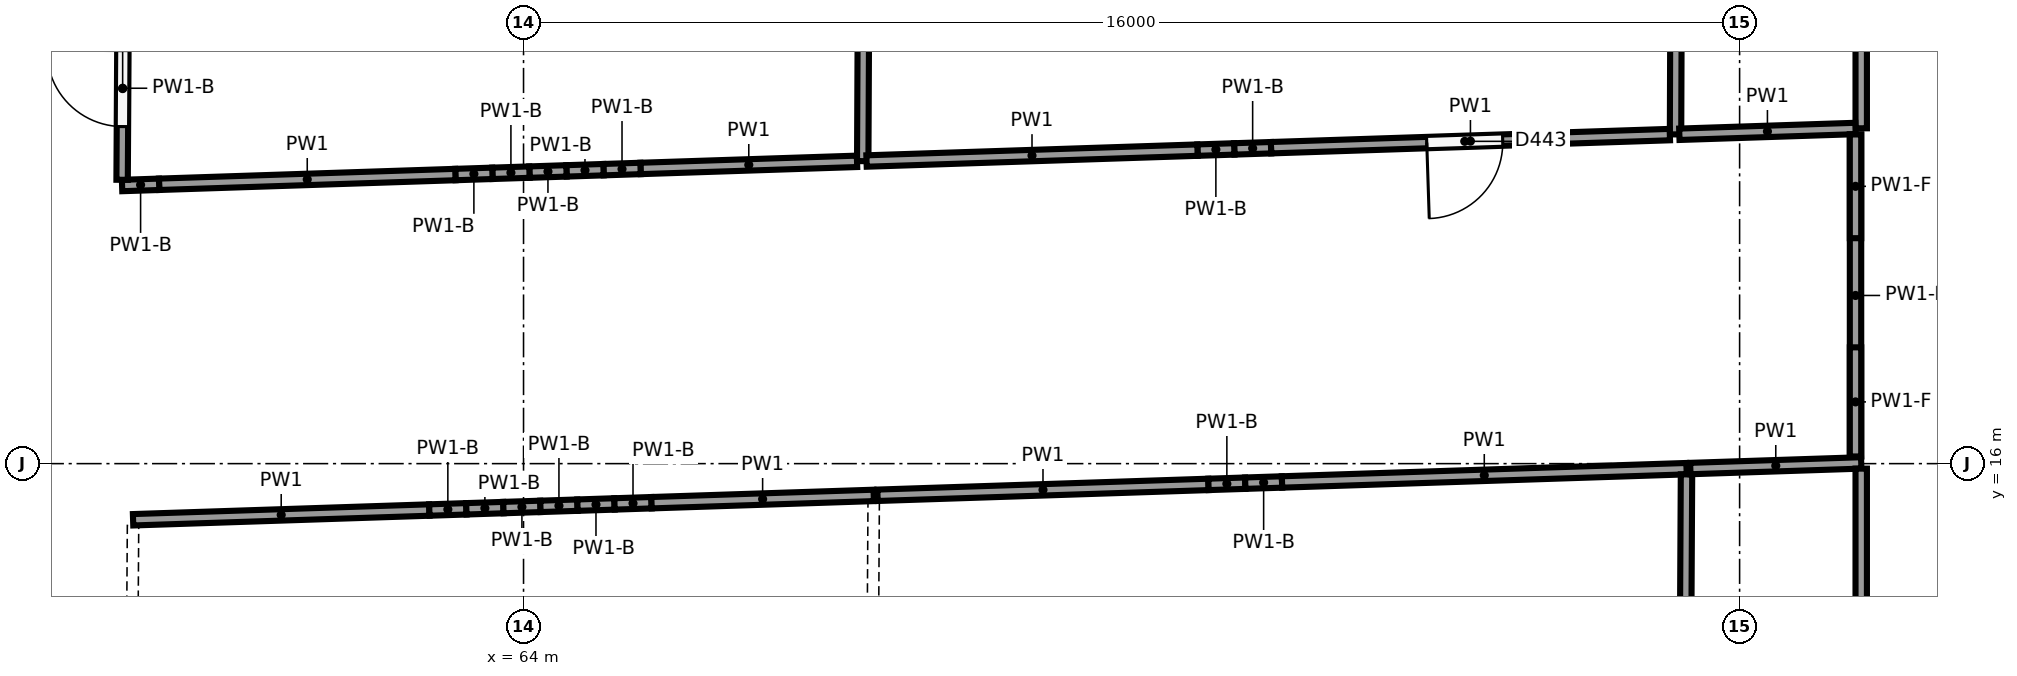
"""IFC4 building model, lengths in metres.
Left out: names, types, materials, properties, quantities, classifications, styles, units other than length and angle.
Written with IfcOpenShell. Run it as: python <this file> out.ifc"""

import sys

from ifc_helpers import new_model, si_unit, direction, frame, frame_2d, origin, origin_2d, place, context, subcontext, project, spatial, rectangle, circle, extrude, element, fill, save


model = new_model("IFC4")
c1 = context("Model", 3, precision=1e-05, world=origin(), true_north=direction((0.0, 1.0)))
c2 = subcontext(c1, "Body", "Model", "MODEL_VIEW")
j1 = project(units=[si_unit("LENGTHUNIT", "METRE"), si_unit("PLANEANGLEUNIT", "RADIAN")], contexts=[c1])
p1 = place(None, origin())
s1 = spatial("IfcSite", under=j1, at=p1, CompositionType="ELEMENT")
p2 = place(p1, origin())
s2 = spatial("IfcBuilding", under=s1, at=p2, CompositionType="ELEMENT")
p3 = place(p2, frame((0.0, 0.0, -4.0)))
s3 = spatial("IfcBuildingStorey", under=s2, at=p3, CompositionType="ELEMENT", Elevation=-4.0)
for number, where, z_axis, x_axis in (
    (1, (58.391, 17.447, -0.4), (0.0, 0.0, 1.0), (1.0, 0.0, 0.0)),
    (2, (63.588, 17.618, -0.4), (0.0, 0.0, 1.0), (1.0, 0.0, 0.0)),
):
    element("IfcColumn", number, at=place(p3, frame(where, z_axis=z_axis, x_axis=x_axis)), inside=s3, PredefinedType="COLUMN", context=c2, shape_type="SweptSolid", body=[
        extrude(circle(Radius=0.45, at=origin_2d()), origin(), (0.0, 0.0, 1.0), 4.4),
    ])
p4 = place(p3, frame((64.887, 17.661, -0.4), z_axis=(0.0, 0.0, 1.0), x_axis=(1.0, 0.0, 0.0)))
e3 = element("IfcColumn", 3, at=p4, inside=s3, PredefinedType="COLUMN", context=c2, shape_type="SweptSolid", body=[
    extrude(circle(Radius=0.4, at=origin_2d()), origin(), (0.0, 0.0, 1.0), 4.4),
])
p5 = place(p3, frame((73.482, 17.944, -0.4), z_axis=(0.0, 0.0, 1.0), x_axis=(1.0, 0.0, 0.0)))
e4 = element("IfcColumn", 4, at=p5, inside=s3, PredefinedType="COLUMN", context=c2, shape_type="SweptSolid", body=[
    extrude(circle(Radius=0.45, at=origin_2d()), origin(), (0.0, 0.0, 1.0), 4.4),
])
p6 = place(p3, frame((58.863, 15.261, 0.0), z_axis=(0.0, 0.0, 1.0), x_axis=(0.999459745106, 0.032866668724, 0.0)))
e5 = element("IfcWall", 5, at=p6, inside=s3, PredefinedType="PARTITIONING", context=c2, shape_type="SweptSolid", body=[
    extrude(rectangle(XDim=3.9, YDim=0.15, at=frame_2d((1.95, 0.0))), origin(), (0.0, 0.0, 1.0), 3.6),
])
for number, where, z_axis, x_axis in (
    (6, (62.76, 15.39, 0.0), (0.0, 0.0, 1.0), (0.999, 0.033, 0.0)),
    (7, (63.248, 15.406, 0.0), (0.0, 0.0, 1.0), (0.999, 0.033, 0.0)),
    (8, (63.735, 15.422, 0.0), (0.0, 0.0, 1.0), (0.999, 0.033, 0.0)),
):
    element("IfcWall", number, at=place(p3, frame(where, z_axis=z_axis, x_axis=x_axis)), inside=s3, PredefinedType="PARTITIONING", context=c2, shape_type="SweptSolid", body=[
        extrude(rectangle(XDim=0.488, YDim=0.15, at=frame_2d((0.244, 0.0))), origin(), (0.0, 0.0, 1.0), 2.5),
    ])
p7 = place(p3, frame((64.222, 15.438, 0.0), z_axis=(0.0, 0.0, 1.0), x_axis=(0.99946964665, 0.032564173951, 0.0)))
e9 = element("IfcWall", 9, at=p7, inside=s3, PredefinedType="PARTITIONING", context=c2, shape_type="SweptSolid", body=[
    extrude(rectangle(XDim=0.487, YDim=0.15, at=frame_2d((0.244, 0.0))), origin(), (0.0, 0.0, 1.0), 2.5),
])
for number, where, z_axis, x_axis in (
    (10, (64.709, 15.454, 0.0), (0.0, 0.0, 1.0), (0.999, 0.033, 0.0)),
    (11, (65.197, 15.47, 0.0), (0.0, 0.0, 1.0), (0.999, 0.033, 0.0)),
):
    element("IfcWall", number, at=place(p3, frame(where, z_axis=z_axis, x_axis=x_axis)), inside=s3, PredefinedType="PARTITIONING", context=c2, shape_type="SweptSolid", body=[
        extrude(rectangle(XDim=0.488, YDim=0.15, at=frame_2d((0.244, 0.0))), origin(), (0.0, 0.0, 1.0), 2.5),
    ])
p8 = place(p3, frame((65.684, 15.486, 0.0), z_axis=(0.0, 0.0, 1.0), x_axis=(0.999461822055, 0.032803448811, 0.0)))
e12 = element("IfcWall", 12, at=p8, inside=s3, PredefinedType="PARTITIONING", context=c2, shape_type="SweptSolid", body=[
    extrude(rectangle(XDim=2.925, YDim=0.15, at=frame_2d((1.462, 0.0))), origin(), (0.0, 0.0, 1.0), 3.6),
])
p9 = place(p3, frame((68.607, 15.507, 0.0), z_axis=(0.0, 0.0, 1.0), x_axis=(-0.006118883866, -0.999981279455, 0.0)))
e13 = element("IfcWall", 13, at=p9, inside=s3, PredefinedType="PARTITIONING", context=c2, shape_type="SweptSolid", body=[
    extrude(rectangle(XDim=9.097, YDim=0.15, at=frame_2d((4.549, 0.0))), origin(), (0.0, 0.0, 1.0), 3.6),
])
p10 = place(p3, frame((58.802, 6.317, 0.0), z_axis=(0.0, 0.0, 1.0), x_axis=(0.006771480952, 0.99997707326, 0.0)))
e14 = element("IfcWall", 14, at=p10, inside=s3, PredefinedType="PARTITIONING", context=c2, shape_type="SweptSolid", body=[
    extrude(rectangle(XDim=8.869, YDim=0.15, at=frame_2d((4.435, 0.0))), origin(), (0.0, 0.0, 1.0), 3.6),
])
p11 = place(p3, frame((68.657, 15.583, 0.0), z_axis=(0.0, 0.0, 1.0), x_axis=(0.999458873683, 0.032893157594, 0.0)))
e15 = element("IfcWall", 15, at=p11, inside=s3, PredefinedType="PARTITIONING", context=c2, shape_type="SweptSolid", body=[
    extrude(rectangle(XDim=4.357, YDim=0.15, at=frame_2d((2.178, 0.0))), origin(), (0.0, 0.0, 1.0), 3.6),
])
for number, where, z_axis, x_axis in (
    (16, (73.012, 15.727, 0.0), (0.0, 0.0, 1.0), (0.999, 0.033, 0.0)),
    (17, (73.496, 15.743, 0.0), (0.0, 0.0, 1.0), (0.999, 0.033, 0.0)),
):
    element("IfcWall", number, at=place(p3, frame(where, z_axis=z_axis, x_axis=x_axis)), inside=s3, PredefinedType="PARTITIONING", context=c2, shape_type="SweptSolid", body=[
        extrude(rectangle(XDim=0.484, YDim=0.15, at=frame_2d((0.242, 0.0))), origin(), (0.0, 0.0, 1.0), 2.5),
    ])
p12 = place(p3, frame((73.979, 15.759, 0.0), z_axis=(0.0, 0.0, 1.0), x_axis=(0.999461070607, 0.03282633608, 0.0)))
e18 = element("IfcWall", 18, at=p12, inside=s3, PredefinedType="PARTITIONING", context=c2, shape_type="SweptSolid", body=[
    extrude(rectangle(XDim=5.325, YDim=0.15, at=frame_2d((2.663, 0.0))), origin(), (0.0, 0.0, 1.0), 3.6),
])
p13 = place(p3, frame((79.301, 15.859, 0.0), z_axis=(0.0, 0.0, 1.0), x_axis=(-0.00544865386, -0.999985155975, 0.0)))
e19 = element("IfcWall", 19, at=p13, inside=s3, PredefinedType="PARTITIONING", context=c2, shape_type="SweptSolid", body=[
    extrude(rectangle(XDim=9.32, YDim=0.15, at=frame_2d((4.66, 0.0))), origin(), (0.0, 0.0, 1.0), 3.6),
])
p14 = place(p3, frame((79.352, 15.935, 0.0), z_axis=(0.0, 0.0, 1.0), x_axis=(0.999459266056, 0.032881233183, 0.0)))
e20 = element("IfcWall", 20, at=p14, inside=s3, PredefinedType="PARTITIONING", context=c2, shape_type="SweptSolid", body=[
    extrude(rectangle(XDim=2.25, YDim=0.15, at=frame_2d((1.125, 0.0))), origin(), (0.0, 0.0, 1.0), 3.6),
])
p15 = place(p3, frame((81.6, 15.934, 0.0), z_axis=(0.0, 0.0, 1.0), x_axis=(0.0, -1.0, 0.0)))
e21 = element("IfcWall", 21, at=p15, inside=s3, PredefinedType="PARTITIONING", context=c2, shape_type="SweptSolid", body=[
    extrude(rectangle(XDim=4.084, YDim=0.15, at=frame_2d((2.042, 0.0))), origin(), (0.0, 0.0, 1.0), 3.6),
])
p16 = place(p3, frame((68.506, 29.15, 0.0), z_axis=(0.0, 0.0, 1.0), x_axis=(-0.004738526292, -0.999988773121, 0.0)))
e22 = element("IfcWall", 22, at=p16, inside=s3, PredefinedType="PARTITIONING", context=c2, shape_type="SweptSolid", body=[
    extrude(rectangle(XDim=9.171, YDim=0.15, at=frame_2d((4.585, 0.0))), origin(), (0.0, 0.0, 1.0), 3.6),
])
p17 = place(p3, frame((68.388, 19.977, 0.0), z_axis=(0.0, 0.0, 1.0), x_axis=(-0.99945879552, -0.032895532483, 0.0)))
e23 = element("IfcWall", 23, at=p17, inside=s3, PredefinedType="PARTITIONING", context=c2, shape_type="SweptSolid", body=[
    extrude(rectangle(XDim=2.85, YDim=0.15, at=frame_2d((1.425, 0.0))), origin(), (0.0, 0.0, 1.0), 3.6),
])
p18 = place(p3, frame((65.539, 19.883, 0.0), z_axis=(0.0, 0.0, 1.0), x_axis=(-0.999470177511, -0.032547876522, 0.0)))
e24 = element("IfcWall", 24, at=p18, inside=s3, PredefinedType="PARTITIONING", context=c2, shape_type="SweptSolid", body=[
    extrude(rectangle(XDim=0.488, YDim=0.15, at=frame_2d((0.244, 0.0))), origin(), (0.0, 0.0, 1.0), 2.5),
])
p19 = place(p3, frame((65.052, 19.867, 0.0), z_axis=(0.0, 0.0, 1.0), x_axis=(-0.999453216043, -0.033064617674, 0.0)))
e25 = element("IfcWall", 25, at=p19, inside=s3, PredefinedType="PARTITIONING", context=c2, shape_type="SweptSolid", body=[
    extrude(rectangle(XDim=0.487, YDim=0.15, at=frame_2d((0.244, 0.0))), origin(), (0.0, 0.0, 1.0), 2.5),
])
for number, where, z_axis, x_axis in (
    (26, (64.565, 19.851, 0.0), (0.0, 0.0, 1.0), (-0.999, -0.033, 0.0)),
    (27, (64.078, 19.835, 0.0), (0.0, 0.0, 1.0), (-0.999, -0.033, 0.0)),
):
    element("IfcWall", number, at=place(p3, frame(where, z_axis=z_axis, x_axis=x_axis)), inside=s3, PredefinedType="PARTITIONING", context=c2, shape_type="SweptSolid", body=[
        extrude(rectangle(XDim=0.488, YDim=0.15, at=frame_2d((0.244, 0.0))), origin(), (0.0, 0.0, 1.0), 2.5),
    ])
p20 = place(p3, frame((63.59, 19.819, 0.0), z_axis=(0.0, 0.0, 1.0), x_axis=(-0.999453216043, -0.033064617674, 0.0)))
e28 = element("IfcWall", 28, at=p20, inside=s3, PredefinedType="PARTITIONING", context=c2, shape_type="SweptSolid", body=[
    extrude(rectangle(XDim=0.487, YDim=0.15, at=frame_2d((0.244, 0.0))), origin(), (0.0, 0.0, 1.0), 2.5),
])
p21 = place(p3, frame((63.103, 19.803, 0.0), z_axis=(0.0, 0.0, 1.0), x_axis=(-0.999459812725, -0.032864612406, 0.0)))
e29 = element("IfcWall", 29, at=p21, inside=s3, PredefinedType="PARTITIONING", context=c2, shape_type="SweptSolid", body=[
    extrude(rectangle(XDim=3.9, YDim=0.15, at=frame_2d((1.95, 0.0))), origin(), (0.0, 0.0, 1.0), 3.6),
])
p22 = place(p3, frame((59.205, 19.675, 0.0), z_axis=(0.0, 0.0, 1.0), x_axis=(-0.999453763336, -0.033048070331, 0.0)))
e30 = element("IfcWall", 30, at=p22, inside=s3, PredefinedType="PARTITIONING", context=c2, shape_type="SweptSolid", body=[
    extrude(rectangle(XDim=0.488, YDim=0.15, at=frame_2d((0.244, 0.0))), origin(), (0.0, 0.0, 1.0), 2.5),
])
p23 = place(p3, frame((58.719, 19.734, 0.0), z_axis=(0.0, 0.0, 1.0), x_axis=(0.005877482589, 0.99998272745, 0.0)))
e31 = element("IfcWall", 31, at=p23, inside=s3, PredefinedType="PARTITIONING", context=c2, shape_type="SweptSolid", body=[
    extrude(rectangle(XDim=2.409, YDim=0.15, at=frame_2d((1.205, 0.0))), origin(), (0.0, 0.0, 1.0), 2.5),
])
p24 = place(p23, frame((0.7, 0.0, 0.0)))
e32 = element("IfcOpeningElement", 32, at=p24, cuts=e31, PredefinedType="OPENING", context=c2, shape_type="SweptSolid", body=[
    extrude(rectangle(XDim=1.0, YDim=2.1, at=frame_2d((0.5, 1.05))), frame((0.0, 0.085, 0.0), z_axis=(0.0, -1.0, 0.0), x_axis=(1.0, 0.0, 0.0)), (0.0, 0.0, 1.0), 0.17),
])
p25 = place(p3, frame((79.191, 29.725, 0.0), z_axis=(0.0, 0.0, 1.0), x_axis=(-0.003612711966, -0.999993474135, 0.0)))
e33 = element("IfcWall", 33, at=p25, inside=s3, PredefinedType="PARTITIONING", context=c2, shape_type="SweptSolid", body=[
    extrude(rectangle(XDim=9.393, YDim=0.15, at=frame_2d((4.697, 0.0))), origin(), (0.0, 0.0, 1.0), 3.6),
])
p26 = place(p3, frame((79.082, 20.329, 0.0), z_axis=(0.0, 0.0, 1.0), x_axis=(-0.999459366608, -0.032878176633, 0.0)))
e34 = element("IfcWall", 34, at=p26, inside=s3, PredefinedType="PARTITIONING", context=c2, shape_type="SweptSolid", body=[
    extrude(rectangle(XDim=5.25, YDim=0.15, at=frame_2d((2.625, 0.0))), origin(), (0.0, 0.0, 1.0), 3.6),
])
p27 = place(p26, frame((2.2, 0.0, 0.0)))
e35 = element("IfcOpeningElement", 35, at=p27, cuts=e34, PredefinedType="OPENING", context=c2, shape_type="SweptSolid", body=[
    extrude(rectangle(XDim=1.0, YDim=2.1, at=frame_2d((0.5, 1.05))), frame((0.0, 0.085, 0.0), z_axis=(0.0, -1.0, 0.0), x_axis=(1.0, 0.0, 0.0)), (0.0, 0.0, 1.0), 0.17),
])
for number, where, z_axis, x_axis in (
    (36, (73.835, 20.156, 0.0), (0.0, 0.0, 1.0), (-0.999, -0.033, 0.0)),
    (37, (73.351, 20.14, 0.0), (0.0, 0.0, 1.0), (-0.999, -0.033, 0.0)),
):
    element("IfcWall", number, at=place(p3, frame(where, z_axis=z_axis, x_axis=x_axis)), inside=s3, PredefinedType="PARTITIONING", context=c2, shape_type="SweptSolid", body=[
        extrude(rectangle(XDim=0.484, YDim=0.15, at=frame_2d((0.242, 0.0))), origin(), (0.0, 0.0, 1.0), 2.5),
    ])
p28 = place(p3, frame((72.867, 20.125, 0.0), z_axis=(0.0, 0.0, 1.0), x_axis=(-0.999458873683, -0.032893157594, 0.0)))
e38 = element("IfcWall", 38, at=p28, inside=s3, PredefinedType="PARTITIONING", context=c2, shape_type="SweptSolid", body=[
    extrude(rectangle(XDim=4.357, YDim=0.15, at=frame_2d((2.178, 0.0))), origin(), (0.0, 0.0, 1.0), 3.6),
])
p29 = place(p3, frame((81.6, 25.575, 0.0), z_axis=(0.0, 0.0, 1.0), x_axis=(0.0, -1.0, 0.0)))
e39 = element("IfcWall", 39, at=p29, inside=s3, PredefinedType="PARTITIONING", context=c2, shape_type="SweptSolid", body=[
    extrude(rectangle(XDim=5.163, YDim=0.15, at=frame_2d((2.582, 0.0))), origin(), (0.0, 0.0, 1.0), 3.6),
])
p30 = place(p3, frame((81.525, 20.409, 0.0), z_axis=(0.0, 0.0, 1.0), x_axis=(-0.999460453172, -0.032845129702, 0.0)))
e40 = element("IfcWall", 40, at=p30, inside=s3, PredefinedType="PARTITIONING", context=c2, shape_type="SweptSolid", body=[
    extrude(rectangle(XDim=2.319, YDim=0.15, at=frame_2d((1.16, 0.0))), origin(), (0.0, 0.0, 1.0), 3.6),
])
p31 = place(p3, frame((81.525, 20.331, 0.0), z_axis=(0.0, 0.0, 1.0), x_axis=(0.0, -1.0, 0.0)))
e41 = element("IfcWall", 41, at=p31, inside=s3, PredefinedType="PARTITIONING", context=c2, shape_type="SweptSolid", body=[
    extrude(rectangle(XDim=4.237, YDim=0.15, at=frame_2d((2.118, 0.0))), origin(), (0.0, 0.0, 1.0), 2.5),
])
p32 = place(p3, frame((81.525, 20.331, 2.5), z_axis=(0.0, 0.0, 1.0), x_axis=(0.0, -1.0, 0.0)))
e42 = element("IfcWall", 42, at=p32, inside=s3, PredefinedType="PARTITIONING", context=c2, shape_type="SweptSolid", body=[
    extrude(rectangle(XDim=1.365, YDim=0.15, at=frame_2d((0.683, 0.0))), origin(), (0.0, 0.0, 1.0), 1.1),
])
p33 = place(p3, frame((81.525, 17.53, 2.5), z_axis=(0.0, 0.0, 1.0), x_axis=(0.0, -1.0, 0.0)))
e43 = element("IfcWall", 43, at=p33, inside=s3, PredefinedType="PARTITIONING", context=c2, shape_type="SweptSolid", body=[
    extrude(rectangle(XDim=1.436, YDim=0.15, at=frame_2d((0.718, 0.0))), origin(), (0.0, 0.0, 1.0), 1.1),
])
p34 = place(p24, origin())
e44 = element("IfcDoor", 44, at=p34, inside=s3, OperationType="SINGLE_SWING_RIGHT", PredefinedType="DOOR", context=c2, shape_type="SweptSolid", body=[
    extrude(rectangle(XDim=1.0, YDim=2.1, at=frame_2d((0.5, 1.05))), frame((0.0, 0.025, 0.0), z_axis=(0.0, -1.0, 0.0), x_axis=(1.0, 0.0, 0.0)), (0.0, 0.0, 1.0), 0.05),
])
fill(e32, e44)
p35 = place(p27, origin())
e45 = element("IfcDoor", 45, at=p35, inside=s3, OperationType="SINGLE_SWING_RIGHT", PredefinedType="DOOR", context=c2, shape_type="SweptSolid", body=[
    extrude(rectangle(XDim=1.0, YDim=2.1, at=frame_2d((0.5, 1.05))), frame((0.0, 0.025, 0.0), z_axis=(0.0, -1.0, 0.0), x_axis=(1.0, 0.0, 0.0)), (0.0, 0.0, 1.0), 0.05),
])
fill(e35, e45)
save(model, sys.argv[1])
